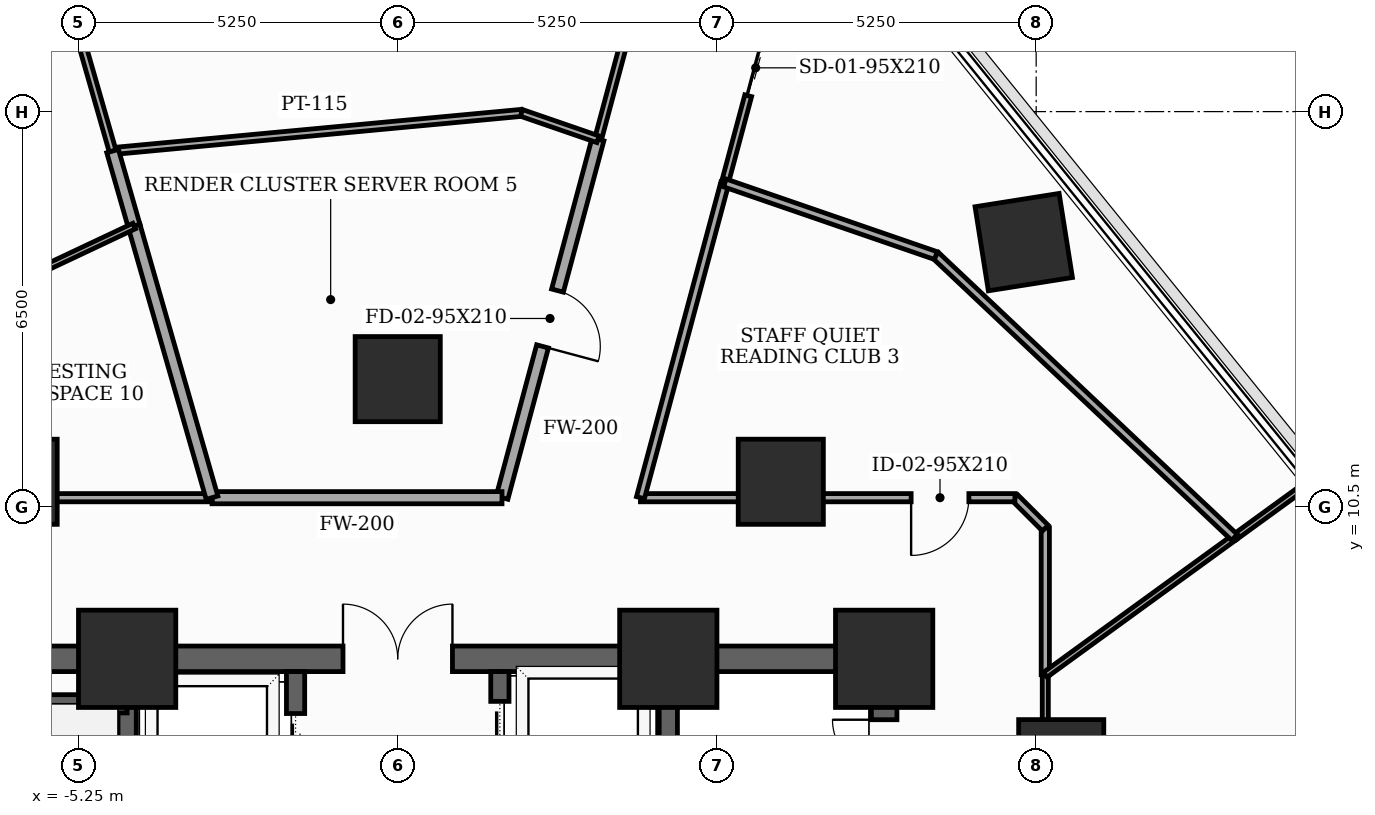
"""IFC4 building model, lengths in metres.
Left out: names, types, materials, properties, quantities, classifications, styles, units other than length and angle.
Written with IfcOpenShell. Run it as: python <this file> out.ifc"""

import sys

from ifc_helpers import new_model, si_unit, direction, frame, frame_2d, origin, origin_2d, place, context, subcontext, project, spatial, rectangle, extrude, element, fill, save


model = new_model("IFC4")
c1 = context("Model", 3, precision=1e-05, world=origin(), true_north=direction((0.0, 1.0)))
c2 = subcontext(c1, "Body", "Model", "MODEL_VIEW")
j1 = project(units=[si_unit("LENGTHUNIT", "METRE"), si_unit("PLANEANGLEUNIT", "RADIAN")], contexts=[c1])
p1 = place(None, origin())
s1 = spatial("IfcSite", under=j1, at=p1, CompositionType="ELEMENT")
p2 = place(p1, origin())
s2 = spatial("IfcBuilding", under=s1, at=p2, CompositionType="ELEMENT")
p3 = place(p2, frame((0.0, 0.0, 59.3)))
s3 = spatial("IfcBuildingStorey", under=s2, at=p3, CompositionType="ELEMENT", Elevation=59.3)
for number, where, z_axis, x_axis in (
    (1, (8.0, 8.0, 0.0), (0.0, 0.0, 1.0), (1.0, 0.0, 0.0)),
    (2, (4.45, 8.0, 0.0), (0.0, 0.0, 1.0), (1.0, 0.0, 0.0)),
    (3, (-4.45, 8.0, 0.0), (0.0, 0.0, 1.0), (1.0, 0.0, 0.0)),
):
    element("IfcColumn", number, at=place(p3, frame(where, z_axis=z_axis, x_axis=x_axis)), inside=s3, PredefinedType="COLUMN", context=c2, shape_type="SweptSolid", body=[
        extrude(rectangle(XDim=1.6, YDim=1.6, at=origin_2d()), origin(), (0.0, 0.0, 1.0), 3.7),
    ])
for number, where, z_axis, x_axis in (
    (4, (10.912, 6.3, 0.0), (0.0, 0.0, 1.0), (1.0, 0.0, 0.0)),
    (5, (6.3, 10.912, 0.0), (0.0, 0.0, 1.0), (1.0, 0.0, 0.0)),
    (6, (0.0, 12.6, 0.0), (0.0, 0.0, 1.0), (1.0, 0.0, 0.0)),
    (7, (-6.3, 10.912, 0.0), (0.0, 0.0, 1.0), (1.0, 0.0, 0.0)),
    (8, (10.295, 14.853, 0.0), (0.0, 0.0, 1.0), (0.988, 0.156, 0.0)),
):
    element("IfcColumn", number, at=place(p3, frame(where, z_axis=z_axis, x_axis=x_axis)), inside=s3, PredefinedType="COLUMN", context=c2, shape_type="SweptSolid", body=[
        extrude(rectangle(XDim=1.4, YDim=1.4, at=origin_2d()), origin(), (0.0, 0.0, 1.0), 3.7),
    ])
p4 = place(p3, frame((8.0, -8.0, 0.0), z_axis=(0.0, 0.0, 1.0), x_axis=(0.0, 1.0, 0.0)))
e9 = element("IfcWall", 9, at=p4, inside=s3, PredefinedType="SHEAR", context=c2, shape_type="SweptSolid", body=[
    extrude(rectangle(XDim=16.0, YDim=0.42, at=frame_2d((8.0, 0.0))), origin(), (0.0, 0.0, 1.0), 3.5),
])
p5 = place(p4, frame((9.6, 0.0, 0.0)))
e10 = element("IfcOpeningElement", 10, at=p5, cuts=e9, PredefinedType="OPENING", context=c2, shape_type="SweptSolid", body=[
    extrude(rectangle(XDim=1.05, YDim=2.15, at=frame_2d((0.525, 1.075))), frame((0.0, 0.22, 0.0), z_axis=(0.0, -1.0, 0.0), x_axis=(1.0, 0.0, 0.0)), (0.0, 0.0, 1.0), 0.44),
])
p6 = place(p4, frame((14.148, 0.0, 0.0)))
e11 = element("IfcOpeningElement", 11, at=p6, cuts=e9, PredefinedType="OPENING", context=c2, shape_type="SweptSolid", body=[
    extrude(rectangle(XDim=0.85, YDim=2.02, at=frame_2d((0.425, 1.01))), frame((0.0, 0.22, 0.0), z_axis=(0.0, -1.0, 0.0), x_axis=(1.0, 0.0, 0.0)), (0.0, 0.0, 1.0), 0.44),
])
p7 = place(p3, frame((-8.0, 8.0, 0.0), z_axis=(0.0, 0.0, 1.0), x_axis=(1.0, 0.0, 0.0)))
e12 = element("IfcWall", 12, at=p7, inside=s3, PredefinedType="SHEAR", context=c2, shape_type="SweptSolid", body=[
    extrude(rectangle(XDim=16.0, YDim=0.42, at=frame_2d((8.0, 0.0))), origin(), (0.0, 0.0, 1.0), 3.5),
])
p8 = place(p7, frame((7.1, 0.0, 0.0)))
e13 = element("IfcOpeningElement", 13, at=p8, cuts=e12, PredefinedType="OPENING", context=c2, shape_type="SweptSolid", body=[
    extrude(rectangle(XDim=1.8, YDim=2.15, at=frame_2d((0.9, 1.075))), frame((0.0, 0.22, 0.0), z_axis=(0.0, -1.0, 0.0), x_axis=(1.0, 0.0, 0.0)), (0.0, 0.0, 1.0), 0.44),
])
for number, where, z_axis, x_axis in (
    (14, (-4.45, -7.79, 0.0), (0.0, 0.0, 1.0), (0.0, 1.0, 0.0)),
    (15, (4.45, -7.79, 0.0), (0.0, 0.0, 1.0), (0.0, 1.0, 0.0)),
):
    element("IfcWall", number, at=place(p3, frame(where, z_axis=z_axis, x_axis=x_axis)), inside=s3, PredefinedType="SHEAR", context=c2, shape_type="SweptSolid", body=[
        extrude(rectangle(XDim=15.58, YDim=0.3, at=frame_2d((7.79, 0.0))), origin(), (0.0, 0.0, 1.0), 3.5),
    ])
p9 = place(p3, frame((-7.79, 7.26, 0.0), z_axis=(0.0, 0.0, 1.0), x_axis=(1.0, 0.0, 0.0)))
e16 = element("IfcWall", 16, at=p9, inside=s3, PredefinedType="SHEAR", context=c2, shape_type="SweptSolid", body=[
    extrude(rectangle(XDim=3.34, YDim=0.3, at=frame_2d((1.67, 0.0))), origin(), (0.0, 0.0, 1.0), 3.5),
])
p10 = place(p3, frame((-1.68, -4.85, 0.0), z_axis=(0.0, 0.0, 1.0), x_axis=(0.0, 1.0, 0.0)))
e17 = element("IfcWall", 17, at=p10, inside=s3, PredefinedType="SHEAR", context=c2, shape_type="SweptSolid", body=[
    extrude(rectangle(XDim=12.64, YDim=0.3, at=frame_2d((6.32, 0.0))), origin(), (0.0, 0.0, 1.0), 3.5),
])
p11 = place(p10, frame((3.95, 0.0, 0.0)))
e18 = element("IfcOpeningElement", 18, at=p11, cuts=e17, PredefinedType="OPENING", context=c2, shape_type="SweptSolid", body=[
    extrude(rectangle(XDim=1.1, YDim=2.1, at=frame_2d((0.55, 1.05))), frame((0.0, 0.16, 0.0), z_axis=(0.0, -1.0, 0.0), x_axis=(1.0, 0.0, 0.0)), (0.0, 0.0, 1.0), 0.32),
])
p12 = place(p10, frame((6.25, 0.0, 0.0)))
e19 = element("IfcOpeningElement", 19, at=p12, cuts=e17, PredefinedType="OPENING", context=c2, shape_type="SweptSolid", body=[
    extrude(rectangle(XDim=1.1, YDim=2.1, at=frame_2d((0.55, 1.05))), frame((0.0, 0.16, 0.0), z_axis=(0.0, -1.0, 0.0), x_axis=(1.0, 0.0, 0.0)), (0.0, 0.0, 1.0), 0.32),
])
p13 = place(p10, frame((8.55, 0.0, 0.0)))
e20 = element("IfcOpeningElement", 20, at=p13, cuts=e17, PredefinedType="OPENING", context=c2, shape_type="SweptSolid", body=[
    extrude(rectangle(XDim=1.1, YDim=2.1, at=frame_2d((0.55, 1.05))), frame((0.0, 0.16, 0.0), z_axis=(0.0, -1.0, 0.0), x_axis=(1.0, 0.0, 0.0)), (0.0, 0.0, 1.0), 0.32),
])
p14 = place(p10, frame((10.85, 0.0, 0.0)))
e21 = element("IfcOpeningElement", 21, at=p14, cuts=e17, PredefinedType="OPENING", context=c2, shape_type="SweptSolid", body=[
    extrude(rectangle(XDim=1.1, YDim=2.1, at=frame_2d((0.55, 1.05))), frame((0.0, 0.16, 0.0), z_axis=(0.0, -1.0, 0.0), x_axis=(1.0, 0.0, 0.0)), (0.0, 0.0, 1.0), 0.32),
])
p15 = place(p10, frame((1.15, 0.0, 0.0)))
e22 = element("IfcOpeningElement", 22, at=p15, cuts=e17, PredefinedType="OPENING", context=c2, shape_type="SweptSolid", body=[
    extrude(rectangle(XDim=0.92, YDim=2.1, at=frame_2d((0.46, 1.05))), frame((0.0, 0.16, 0.0), z_axis=(0.0, -1.0, 0.0), x_axis=(1.0, 0.0, 0.0)), (0.0, 0.0, 1.0), 0.32),
])
p16 = place(p3, frame((1.68, -4.85, 0.0), z_axis=(0.0, 0.0, 1.0), x_axis=(0.0, 1.0, 0.0)))
e23 = element("IfcWall", 23, at=p16, inside=s3, PredefinedType="SHEAR", context=c2, shape_type="SweptSolid", body=[
    extrude(rectangle(XDim=12.64, YDim=0.3, at=frame_2d((6.32, 0.0))), origin(), (0.0, 0.0, 1.0), 3.5),
])
p17 = place(p16, frame((0.55, 0.0, 0.0)))
e24 = element("IfcOpeningElement", 24, at=p17, cuts=e23, PredefinedType="OPENING", context=c2, shape_type="SweptSolid", body=[
    extrude(rectangle(XDim=1.1, YDim=2.1, at=frame_2d((0.55, 1.05))), frame((0.0, 0.16, 0.0), z_axis=(0.0, -1.0, 0.0), x_axis=(1.0, 0.0, 0.0)), (0.0, 0.0, 1.0), 0.32),
])
p18 = place(p16, frame((2.65, 0.0, 0.0)))
e25 = element("IfcOpeningElement", 25, at=p18, cuts=e23, PredefinedType="OPENING", context=c2, shape_type="SweptSolid", body=[
    extrude(rectangle(XDim=1.1, YDim=2.1, at=frame_2d((0.55, 1.05))), frame((0.0, 0.16, 0.0), z_axis=(0.0, -1.0, 0.0), x_axis=(1.0, 0.0, 0.0)), (0.0, 0.0, 1.0), 0.32),
])
p19 = place(p16, frame((4.75, 0.0, 0.0)))
e26 = element("IfcOpeningElement", 26, at=p19, cuts=e23, PredefinedType="OPENING", context=c2, shape_type="SweptSolid", body=[
    extrude(rectangle(XDim=1.1, YDim=2.1, at=frame_2d((0.55, 1.05))), frame((0.0, 0.16, 0.0), z_axis=(0.0, -1.0, 0.0), x_axis=(1.0, 0.0, 0.0)), (0.0, 0.0, 1.0), 0.32),
])
p20 = place(p16, frame((6.85, 0.0, 0.0)))
e27 = element("IfcOpeningElement", 27, at=p20, cuts=e23, PredefinedType="OPENING", context=c2, shape_type="SweptSolid", body=[
    extrude(rectangle(XDim=1.1, YDim=2.1, at=frame_2d((0.55, 1.05))), frame((0.0, 0.16, 0.0), z_axis=(0.0, -1.0, 0.0), x_axis=(1.0, 0.0, 0.0)), (0.0, 0.0, 1.0), 0.32),
])
p21 = place(p16, frame((8.95, 0.0, 0.0)))
e28 = element("IfcOpeningElement", 28, at=p21, cuts=e23, PredefinedType="OPENING", context=c2, shape_type="SweptSolid", body=[
    extrude(rectangle(XDim=1.1, YDim=2.1, at=frame_2d((0.55, 1.05))), frame((0.0, 0.16, 0.0), z_axis=(0.0, -1.0, 0.0), x_axis=(1.0, 0.0, 0.0)), (0.0, 0.0, 1.0), 0.32),
])
p22 = place(p16, frame((11.05, 0.0, 0.0)))
e29 = element("IfcOpeningElement", 29, at=p22, cuts=e23, PredefinedType="OPENING", context=c2, shape_type="SweptSolid", body=[
    extrude(rectangle(XDim=1.1, YDim=2.1, at=frame_2d((0.55, 1.05))), frame((0.0, 0.16, 0.0), z_axis=(0.0, -1.0, 0.0), x_axis=(1.0, 0.0, 0.0)), (0.0, 0.0, 1.0), 0.32),
])
p23 = place(p3, frame((10.65, -1.715, 0.0), z_axis=(0.0, 0.0, 1.0), x_axis=(0.0, 1.0, 0.0)))
e30 = element("IfcWall", 30, at=p23, inside=s3, PredefinedType="MOVABLE", context=c2, shape_type="SweptSolid", body=[
    extrude(rectangle(XDim=9.453, YDim=0.1, at=frame_2d((4.727, 0.0))), origin(), (0.0, 0.0, 1.0), 2.785),
])
p24 = place(p3, frame((10.65, 7.738, 0.0), z_axis=(0.0, 0.0, 1.0), x_axis=(0.0, 1.0, 0.0)))
e31 = element("IfcWall", 31, at=p24, inside=s3, PredefinedType="PARTITIONING", context=c2, shape_type="SweptSolid", body=[
    extrude(rectangle(XDim=2.412, YDim=0.135, at=frame_2d((1.206, 0.0))), origin(), (0.0, 0.0, 1.0), 3.5),
])
p25 = place(p3, frame((10.65, 10.15, 0.0), z_axis=(0.0, 0.0, 1.0), x_axis=(-0.707106781187, 0.707106781187, 0.0)))
e32 = element("IfcWall", 32, at=p25, inside=s3, PredefinedType="PARTITIONING", context=c2, shape_type="SweptSolid", body=[
    extrude(rectangle(XDim=0.707, YDim=0.135, at=frame_2d((0.354, 0.0))), origin(), (0.0, 0.0, 1.0), 3.5),
])
p26 = place(p3, frame((10.15, 10.65, 0.0), z_axis=(0.0, 0.0, 1.0), x_axis=(-1.0, 0.0, 0.0)))
e33 = element("IfcWall", 33, at=p26, inside=s3, PredefinedType="PARTITIONING", context=c2, shape_type="SweptSolid", body=[
    extrude(rectangle(XDim=6.158, YDim=0.135, at=frame_2d((3.079, 0.0))), origin(), (0.0, 0.0, 1.0), 2.785),
])
p27 = place(p26, frame((0.757, 0.0, 0.0)))
e34 = element("IfcOpeningElement", 34, at=p27, cuts=e33, PredefinedType="OPENING", context=c2, shape_type="SweptSolid", body=[
    extrude(rectangle(XDim=0.95, YDim=2.1, at=frame_2d((0.475, 1.05))), frame((0.0, 0.077, 0.0), z_axis=(0.0, -1.0, 0.0), x_axis=(1.0, 0.0, 0.0)), (0.0, 0.0, 1.0), 0.155),
])
p28 = place(p3, frame((3.992, 10.65, 0.0), z_axis=(0.0, 0.0, 1.0), x_axis=(0.258952377387, 0.965890090148, 0.0)))
e35 = element("IfcWall", 35, at=p28, inside=s3, PredefinedType="PARTITIONING", context=c2, shape_type="SweptSolid", body=[
    extrude(rectangle(XDim=5.36, YDim=0.135, at=frame_2d((2.68, 0.0))), origin(), (0.0, 0.0, 1.0), 2.785),
])
p29 = place(p3, frame((5.38, 15.827, 0.0), z_axis=(0.0, 0.0, 1.0), x_axis=(0.258740236453, 0.965946939557, 0.0)))
e36 = element("IfcWall", 36, at=p29, inside=s3, PredefinedType="PARTITIONING", context=c2, shape_type="SweptSolid", body=[
    extrude(rectangle(XDim=3.92, YDim=0.115, at=frame_2d((1.96, 0.0))), origin(), (0.0, 0.0, 1.0), 2.935),
])
p30 = place(p29, frame((1.485, 0.0, 0.0)))
e37 = element("IfcOpeningElement", 37, at=p30, cuts=e36, PredefinedType="OPENING", context=c2, shape_type="SweptSolid", body=[
    extrude(rectangle(XDim=0.95, YDim=2.1, at=frame_2d((0.475, 1.05))), frame((0.0, 0.067, 0.0), z_axis=(0.0, -1.0, 0.0), x_axis=(1.0, 0.0, 0.0)), (0.0, 0.0, 1.0), 0.135),
])
p31 = place(p3, frame((4.269, 20.183, 0.0), z_axis=(0.0, 0.0, 1.0), x_axis=(-0.258880798168, -0.965909277489, 0.0)))
e38 = element("IfcWall", 38, at=p31, inside=s3, PredefinedType="PARTITIONING", context=c2, shape_type="SweptSolid", body=[
    extrude(rectangle(XDim=3.767, YDim=0.115, at=frame_2d((1.883, 0.0))), origin(), (0.0, 0.0, 1.0), 3.085),
])
p32 = place(p3, frame((3.294, 16.545, 0.0), z_axis=(0.0, 0.0, 1.0), x_axis=(-0.258710756328, -0.965954835673, 0.0)))
e39 = element("IfcWall", 39, at=p32, inside=s3, PredefinedType="SOLIDWALL", context=c2, shape_type="SweptSolid", body=[
    extrude(rectangle(XDim=6.103, YDim=0.2, at=frame_2d((3.051, 0.0))), origin(), (0.0, 0.0, 1.0), 2.785),
])
p33 = place(p32, frame((2.576, 0.0, 0.0)))
e40 = element("IfcOpeningElement", 40, at=p33, cuts=e39, PredefinedType="OPENING", context=c2, shape_type="SweptSolid", body=[
    extrude(rectangle(XDim=0.95, YDim=2.1, at=frame_2d((0.475, 1.05))), frame((0.0, 0.11, 0.0), z_axis=(0.0, -1.0, 0.0), x_axis=(1.0, 0.0, 0.0)), (0.0, 0.0, 1.0), 0.22),
])
p34 = place(p3, frame((1.715, 10.65, 0.0), z_axis=(0.0, 0.0, 1.0), x_axis=(-1.0, 0.0, 0.0)))
e41 = element("IfcWall", 41, at=p34, inside=s3, PredefinedType="SOLIDWALL", context=c2, shape_type="SweptSolid", body=[
    extrude(rectangle(XDim=4.769, YDim=0.2, at=frame_2d((2.385, 0.0))), origin(), (0.0, 0.0, 1.0), 2.785),
])
p35 = place(p3, frame((-3.054, 10.65, 0.0), z_axis=(0.0, 0.0, 1.0), x_axis=(-1.0, 0.0, 0.0)))
e42 = element("IfcWall", 42, at=p35, inside=s3, PredefinedType="PARTITIONING", context=c2, shape_type="SweptSolid", body=[
    extrude(rectangle(XDim=7.096, YDim=0.135, at=frame_2d((3.548, 0.0))), origin(), (0.0, 0.0, 1.0), 2.785),
])
p36 = place(p3, frame((13.761, 9.998, 0.0), z_axis=(0.0, 0.0, 1.0), x_axis=(-0.809057190408, -0.587729923221, 0.0)))
e43 = element("IfcWall", 43, at=p36, inside=s3, PredefinedType="MOVABLE", context=c2, shape_type="SweptSolid", body=[
    extrude(rectangle(XDim=3.845, YDim=0.1, at=frame_2d((1.923, 0.0))), origin(), (0.0, 0.0, 1.0), 3.085),
])
p37 = place(p3, frame((15.002, 10.9, 0.0), z_axis=(0.0, 0.0, 1.0), x_axis=(-0.809128115206, -0.587632277179, 0.0)))
e44 = element("IfcWall", 44, at=p37, inside=s3, PredefinedType="MOVABLE", context=c2, shape_type="SweptSolid", body=[
    extrude(rectangle(XDim=1.534, YDim=0.1, at=frame_2d((0.767, 0.0))), origin(), (0.0, 0.0, 1.0), 2.925),
])
p38 = place(p3, frame((13.761, 9.998, 0.0), z_axis=(0.0, 0.0, 1.0), x_axis=(-0.727310898058, 0.68630813602, 0.0)))
e45 = element("IfcWall", 45, at=p38, inside=s3, PredefinedType="PARTITIONING", context=c2, shape_type="SweptSolid", body=[
    extrude(rectangle(XDim=6.752, YDim=0.135, at=frame_2d((3.376, 0.0))), origin(), (0.0, 0.0, 1.0), 2.785),
])
p39 = place(p3, frame((8.85, 14.632, 0.0), z_axis=(0.0, 0.0, 1.0), x_axis=(-0.945524159467, 0.325551937275, 0.0)))
e46 = element("IfcWall", 46, at=p39, inside=s3, PredefinedType="PARTITIONING", context=c2, shape_type="SweptSolid", body=[
    extrude(rectangle(XDim=3.67, YDim=0.135, at=frame_2d((1.835, 0.0))), origin(), (0.0, 0.0, 1.0), 3.085),
])
p40 = place(p3, frame((-4.689, 16.351, 0.0), z_axis=(0.0, 0.0, 1.0), x_axis=(0.995667654368, 0.092983450384, 0.0)))
e47 = element("IfcWall", 47, at=p40, inside=s3, PredefinedType="PARTITIONING", context=c2, shape_type="SweptSolid", body=[
    extrude(rectangle(XDim=6.753, YDim=0.115, at=frame_2d((3.376, 0.0))), origin(), (0.0, 0.0, 1.0), 2.785),
])
p41 = place(p3, frame((2.035, 16.979, 0.0), z_axis=(0.0, 0.0, 1.0), x_axis=(0.945388565789, -0.325945485742, 0.0)))
e48 = element("IfcWall", 48, at=p41, inside=s3, PredefinedType="PARTITIONING", context=c2, shape_type="SweptSolid", body=[
    extrude(rectangle(XDim=1.332, YDim=0.115, at=frame_2d((0.666, 0.0))), origin(), (0.0, 0.0, 1.0), 3.5),
])
p42 = place(p3, frame((-8.481, 29.58, 0.0), z_axis=(0.0, 0.0, 1.0), x_axis=(0.275587979828, -0.961275852903, 0.0)))
e49 = element("IfcWall", 49, at=p42, inside=s3, PredefinedType="PARTITIONING", context=c2, shape_type="SweptSolid", body=[
    extrude(rectangle(XDim=13.761, YDim=0.115, at=frame_2d((6.881, 0.0))), origin(), (0.0, 0.0, 1.0), 2.935),
])
p43 = place(p42, frame((6.421, 0.0, 0.0)))
e50 = element("IfcOpeningElement", 50, at=p43, cuts=e49, PredefinedType="OPENING", context=c2, shape_type="SweptSolid", body=[
    extrude(rectangle(XDim=0.92, YDim=2.1, at=frame_2d((0.46, 1.05))), frame((0.0, 0.067, 0.0), z_axis=(0.0, -1.0, 0.0), x_axis=(1.0, 0.0, 0.0)), (0.0, 0.0, 1.0), 0.135),
])
p44 = place(p3, frame((-4.689, 16.351, 0.0), z_axis=(0.0, 0.0, 1.0), x_axis=(0.275927308223, -0.961178506094, 0.0)))
e51 = element("IfcWall", 51, at=p44, inside=s3, PredefinedType="SOLIDWALL", context=c2, shape_type="SweptSolid", body=[
    extrude(rectangle(XDim=1.283, YDim=0.2, at=frame_2d((0.642, 0.0))), origin(), (0.0, 0.0, 1.0), 3.5),
])
p45 = place(p3, frame((-4.335, 15.118, 0.0), z_axis=(0.0, 0.0, 1.0), x_axis=(0.275602055924, -0.961271817318, 0.0)))
e52 = element("IfcWall", 52, at=p45, inside=s3, PredefinedType="SOLIDWALL", context=c2, shape_type="SweptSolid", body=[
    extrude(rectangle(XDim=4.648, YDim=0.2, at=frame_2d((2.324, 0.0))), origin(), (0.0, 0.0, 1.0), 2.785),
])
p46 = place(p3, frame((-9.287, 12.782, 0.0), z_axis=(0.0, 0.0, 1.0), x_axis=(0.904430294069, 0.4266214284, 0.0)))
e53 = element("IfcWall", 53, at=p46, inside=s3, PredefinedType="MOVABLE", context=c2, shape_type="SweptSolid", body=[
    extrude(rectangle(XDim=5.475, YDim=0.1, at=frame_2d((2.738, 0.0))), origin(), (0.0, 0.0, 1.0), 2.785),
])
p47 = place(p6, origin())
e54 = element("IfcDoor", 54, at=p47, inside=s3, OperationType="SINGLE_SWING_RIGHT", PredefinedType="TRAPDOOR", context=c2, shape_type="SweptSolid", body=[
    extrude(rectangle(XDim=0.85, YDim=2.02, at=frame_2d((0.425, 1.01))), frame((0.0, 0.025, 0.0), z_axis=(0.0, -1.0, 0.0), x_axis=(1.0, 0.0, 0.0)), (0.0, 0.0, 1.0), 0.05),
])
fill(e11, e54)
p48 = place(p8, origin())
e55 = element("IfcDoor", 55, at=p48, inside=s3, OperationType="DOUBLE_DOOR_SINGLE_SWING", PredefinedType="DOOR", context=c2, shape_type="SweptSolid", body=[
    extrude(rectangle(XDim=1.8, YDim=2.15, at=frame_2d((0.9, 1.075))), frame((0.0, 0.025, 0.0), z_axis=(0.0, -1.0, 0.0), x_axis=(1.0, 0.0, 0.0)), (0.0, 0.0, 1.0), 0.05),
])
fill(e13, e55)
p49 = place(p14, origin())
e56 = element("IfcDoor", 56, at=p49, inside=s3, OperationType="SLIDING_TO_LEFT", PredefinedType="DOOR", context=c2, shape_type="SweptSolid", body=[
    extrude(rectangle(XDim=1.1, YDim=2.1, at=frame_2d((0.55, 1.05))), frame((0.0, 0.025, 0.0), z_axis=(0.0, -1.0, 0.0), x_axis=(1.0, 0.0, 0.0)), (0.0, 0.0, 1.0), 0.05),
])
fill(e21, e56)
p50 = place(p22, origin())
e57 = element("IfcDoor", 57, at=p50, inside=s3, OperationType="SLIDING_TO_LEFT", PredefinedType="DOOR", context=c2, shape_type="SweptSolid", body=[
    extrude(rectangle(XDim=1.1, YDim=2.1, at=frame_2d((0.55, 1.05))), frame((0.0, 0.025, 0.0), z_axis=(0.0, -1.0, 0.0), x_axis=(1.0, 0.0, 0.0)), (0.0, 0.0, 1.0), 0.05),
])
fill(e29, e57)
p51 = place(p27, origin())
e58 = element("IfcDoor", 58, at=p51, inside=s3, OperationType="SINGLE_SWING_RIGHT", PredefinedType="DOOR", context=c2, shape_type="SweptSolid", body=[
    extrude(rectangle(XDim=0.95, YDim=2.1, at=frame_2d((0.475, 1.05))), frame((0.0, 0.025, 0.0), z_axis=(0.0, -1.0, 0.0), x_axis=(1.0, 0.0, 0.0)), (0.0, 0.0, 1.0), 0.05),
])
fill(e34, e58)
p52 = place(p30, origin())
e59 = element("IfcDoor", 59, at=p52, inside=s3, OperationType="SLIDING_TO_LEFT", PredefinedType="DOOR", context=c2, shape_type="SweptSolid", body=[
    extrude(rectangle(XDim=0.95, YDim=2.1, at=frame_2d((0.475, 1.05))), frame((0.0, 0.025, 0.0), z_axis=(0.0, -1.0, 0.0), x_axis=(1.0, 0.0, 0.0)), (0.0, 0.0, 1.0), 0.05),
])
fill(e37, e59)
p53 = place(p33, origin())
e60 = element("IfcDoor", 60, at=p53, inside=s3, OperationType="SINGLE_SWING_RIGHT", PredefinedType="DOOR", context=c2, shape_type="SweptSolid", body=[
    extrude(rectangle(XDim=0.95, YDim=2.1, at=frame_2d((0.475, 1.05))), frame((0.0, 0.025, 0.0), z_axis=(0.0, -1.0, 0.0), x_axis=(1.0, 0.0, 0.0)), (0.0, 0.0, 1.0), 0.05),
])
fill(e40, e60)
save(model, sys.argv[1])
